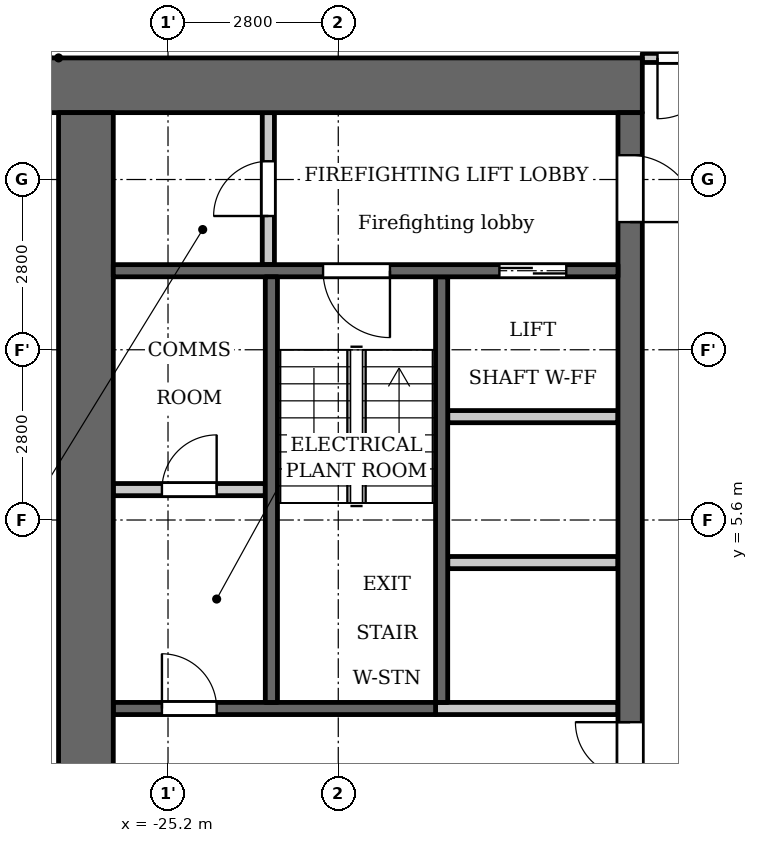
"""IFC4 building model, lengths in metres.
Left out: names, types, materials, properties, quantities, classifications, styles, units other than length and angle.
Written with IfcOpenShell. Run it as: python <this file> out.ifc"""

import sys

from ifc_helpers import new_model, si_unit, direction, frame, frame_2d, origin, place, context, subcontext, project, spatial, rectangle, extrude, element, fill, save


model = new_model("IFC4")
c1 = context("Model", 3, precision=1e-05, world=origin(), true_north=direction((0.0, 1.0)))
c2 = subcontext(c1, "Body", "Model", "MODEL_VIEW")
j1 = project(units=[si_unit("LENGTHUNIT", "METRE"), si_unit("PLANEANGLEUNIT", "RADIAN")], contexts=[c1])
p1 = place(None, origin())
s1 = spatial("IfcSite", under=j1, at=p1, CompositionType="ELEMENT")
p2 = place(p1, origin())
s2 = spatial("IfcBuilding", under=s1, at=p2, CompositionType="ELEMENT")
p3 = place(p2, frame((0.0, 0.0, 121.8)))
s3 = spatial("IfcBuildingStorey", under=s2, at=p3, CompositionType="ELEMENT", Elevation=121.8)
p4 = place(p3, frame((-20.7, 2.6, 0.0), z_axis=(0.0, 0.0, 1.0), x_axis=(0.0, 1.0, 0.0)))
e1 = element("IfcWall", 1, at=p4, inside=s3, PredefinedType="SHEAR", context=c2, shape_type="SweptSolid", body=[
    extrude(rectangle(XDim=7.0, YDim=0.2, at=frame_2d((3.5, 0.0))), origin(), (0.0, 0.0, 1.0), 3.15),
])
p5 = place(p3, frame((-20.8, 2.5, 0.0), z_axis=(0.0, 0.0, 1.0), x_axis=(-1.0, 0.0, 0.0)))
e2 = element("IfcWall", 2, at=p5, inside=s3, PredefinedType="SHEAR", context=c2, shape_type="SweptSolid", body=[
    extrude(rectangle(XDim=5.3, YDim=0.2, at=frame_2d((2.65, 0.0))), origin(), (0.0, 0.0, 1.0), 3.15),
])
p6 = place(p5, frame((3.6, 0.0, 0.0)))
e3 = element("IfcOpeningElement", 3, at=p6, cuts=e2, PredefinedType="OPENING", context=c2, shape_type="SweptSolid", body=[
    extrude(rectangle(XDim=0.9, YDim=2.1, at=frame_2d((0.45, 1.05))), frame((0.0, 0.11, 0.0), z_axis=(0.0, -1.0, 0.0), x_axis=(1.0, 0.0, 0.0)), (0.0, 0.0, 1.0), 0.22),
])
p7 = place(p3, frame((-17.4, 12.75, 0.0), z_axis=(0.0, 0.0, 1.0), x_axis=(-1.0, 0.0, 0.0)))
e4 = element("IfcWall", 4, at=p7, inside=s3, PredefinedType="SHEAR", context=c2, shape_type="SweptSolid", body=[
    extrude(rectangle(XDim=10.4, YDim=0.9, at=frame_2d((5.2, 0.0))), origin(), (0.0, 0.0, 1.0), 3.15),
])
p8 = place(p3, frame((-17.6, -12.3, 0.0), z_axis=(0.0, 0.0, 1.0), x_axis=(0.0, 1.0, 0.0)))
e5 = element("IfcWall", 5, at=p8, inside=s3, PredefinedType="SHEAR", context=c2, shape_type="SweptSolid", body=[
    extrude(rectangle(XDim=24.6, YDim=0.4, at=frame_2d((12.3, 0.0))), origin(), (0.0, 0.0, 1.0), 3.15),
])
p9 = place(p8, frame((6.0, 0.0, 0.0)))
e6 = element("IfcOpeningElement", 6, at=p9, cuts=e5, PredefinedType="OPENING", context=c2, shape_type="SweptSolid", body=[
    extrude(rectangle(XDim=1.1, YDim=2.1, at=frame_2d((0.55, 1.05))), frame((0.0, 0.21, 0.0), z_axis=(0.0, -1.0, 0.0), x_axis=(1.0, 0.0, 0.0)), (0.0, 0.0, 1.0), 0.42),
])
p10 = place(p8, frame((8.4, 0.0, 0.0)))
e7 = element("IfcOpeningElement", 7, at=p10, cuts=e5, PredefinedType="OPENING", context=c2, shape_type="SweptSolid", body=[
    extrude(rectangle(XDim=1.1, YDim=2.1, at=frame_2d((0.55, 1.05))), frame((0.0, 0.21, 0.0), z_axis=(0.0, -1.0, 0.0), x_axis=(1.0, 0.0, 0.0)), (0.0, 0.0, 1.0), 0.42),
])
p11 = place(p8, frame((10.8, 0.0, 0.0)))
e8 = element("IfcOpeningElement", 8, at=p11, cuts=e5, PredefinedType="OPENING", context=c2, shape_type="SweptSolid", body=[
    extrude(rectangle(XDim=1.1, YDim=2.1, at=frame_2d((0.55, 1.05))), frame((0.0, 0.21, 0.0), z_axis=(0.0, -1.0, 0.0), x_axis=(1.0, 0.0, 0.0)), (0.0, 0.0, 1.0), 0.42),
])
p12 = place(p8, frame((22.8, 0.0, 0.0)))
e9 = element("IfcOpeningElement", 9, at=p12, cuts=e5, PredefinedType="OPENING", context=c2, shape_type="SweptSolid", body=[
    extrude(rectangle(XDim=1.1, YDim=2.1, at=frame_2d((0.55, 1.05))), frame((0.0, 0.21, 0.0), z_axis=(0.0, -1.0, 0.0), x_axis=(1.0, 0.0, 0.0)), (0.0, 0.0, 1.0), 0.42),
])
p13 = place(p8, frame((0.7, 0.0, 0.0)))
e10 = element("IfcOpeningElement", 10, at=p13, cuts=e5, PredefinedType="OPENING", context=c2, shape_type="SweptSolid", body=[
    extrude(rectangle(XDim=1.1, YDim=2.1, at=frame_2d((0.55, 1.05))), frame((0.0, 0.21, 0.0), z_axis=(0.0, -1.0, 0.0), x_axis=(1.0, 0.0, 0.0)), (0.0, 0.0, 1.0), 0.42),
])
p14 = place(p8, frame((12.775, 0.0, 0.0)))
e11 = element("IfcOpeningElement", 11, at=p14, cuts=e5, PredefinedType="OPENING", context=c2, shape_type="SweptSolid", body=[
    extrude(rectangle(XDim=1.8, YDim=2.1, at=frame_2d((0.9, 1.05))), frame((0.0, 0.21, 0.0), z_axis=(0.0, -1.0, 0.0), x_axis=(1.0, 0.0, 0.0)), (0.0, 0.0, 1.0), 0.42),
])
p15 = place(p3, frame((-26.55, -12.3, 0.0), z_axis=(0.0, 0.0, 1.0), x_axis=(0.0, 1.0, 0.0)))
e12 = element("IfcWall", 12, at=p15, inside=s3, PredefinedType="SHEAR", context=c2, shape_type="SweptSolid", body=[
    extrude(rectangle(XDim=24.6, YDim=0.9, at=frame_2d((12.3, 0.0))), origin(), (0.0, 0.0, 1.0), 3.15),
])
p16 = place(p3, frame((-23.55, 9.8, 0.0), z_axis=(0.0, 0.0, 1.0), x_axis=(0.0, 1.0, 0.0)))
e13 = element("IfcWall", 13, at=p16, inside=s3, PredefinedType="PARTITIONING", context=c2, shape_type="SweptSolid", body=[
    extrude(rectangle(XDim=2.5, YDim=0.2, at=frame_2d((1.25, 0.0))), origin(), (0.0, 0.0, 1.0), 3.15),
])
p17 = place(p16, frame((0.8, 0.0, 0.0)))
e14 = element("IfcOpeningElement", 14, at=p17, cuts=e13, PredefinedType="OPENING", context=c2, shape_type="SweptSolid", body=[
    extrude(rectangle(XDim=0.9, YDim=2.1, at=frame_2d((0.45, 1.05))), frame((0.0, 0.11, 0.0), z_axis=(0.0, -1.0, 0.0), x_axis=(1.0, 0.0, 0.0)), (0.0, 0.0, 1.0), 0.22),
])
p18 = place(p3, frame((-23.6, 6.1, 0.0), z_axis=(0.0, 0.0, 1.0), x_axis=(-1.0, 0.0, 0.0)))
e15 = element("IfcWall", 15, at=p18, inside=s3, PredefinedType="PARTITIONING", context=c2, shape_type="SweptSolid", body=[
    extrude(rectangle(XDim=2.5, YDim=0.2, at=frame_2d((1.25, 0.0))), origin(), (0.0, 0.0, 1.0), 3.15),
])
p19 = place(p18, frame((0.8, 0.0, 0.0)))
e16 = element("IfcOpeningElement", 16, at=p19, cuts=e15, PredefinedType="OPENING", context=c2, shape_type="SweptSolid", body=[
    extrude(rectangle(XDim=0.9, YDim=2.1, at=frame_2d((0.45, 1.05))), frame((0.0, 0.11, 0.0), z_axis=(0.0, -1.0, 0.0), x_axis=(1.0, 0.0, 0.0)), (0.0, 0.0, 1.0), 0.22),
])
p20 = place(p3, frame((-17.8, 2.5, 0.0), z_axis=(0.0, 0.0, 1.0), x_axis=(-1.0, 0.0, 0.0)))
e17 = element("IfcWall", 17, at=p20, inside=s3, PredefinedType="PARTITIONING", context=c2, shape_type="SweptSolid", body=[
    extrude(rectangle(XDim=3.0, YDim=0.2, at=frame_2d((1.5, 0.0))), origin(), (0.0, 0.0, 1.0), 3.15),
])
for number, where, z_axis, x_axis in (
    (18, (-17.8, 4.9, 0.0), (0.0, 0.0, 1.0), (-1.0, 0.0, 0.0)),
    (19, (-17.8, 7.3, 0.0), (0.0, 0.0, 1.0), (-1.0, 0.0, 0.0)),
):
    element("IfcWall", number, at=place(p3, frame(where, z_axis=z_axis, x_axis=x_axis)), inside=s3, PredefinedType="PARTITIONING", context=c2, shape_type="SweptSolid", body=[
        extrude(rectangle(XDim=2.8, YDim=0.2, at=frame_2d((1.4, 0.0))), origin(), (0.0, 0.0, 1.0), 3.15),
    ])
p21 = place(p3, frame((-17.8, 9.7, 0.0), z_axis=(0.0, 0.0, 1.0), x_axis=(-1.0, 0.0, 0.0)))
e20 = element("IfcWall", 20, at=p21, inside=s3, PredefinedType="SHEAR", context=c2, shape_type="SweptSolid", body=[
    extrude(rectangle(XDim=8.3, YDim=0.2, at=frame_2d((4.15, 0.0))), origin(), (0.0, 0.0, 1.0), 3.15),
])
p22 = place(p21, frame((0.85, 0.0, 0.0)))
e21 = element("IfcOpeningElement", 21, at=p22, cuts=e20, PredefinedType="OPENING", context=c2, shape_type="SweptSolid", body=[
    extrude(rectangle(XDim=1.1, YDim=2.1, at=frame_2d((0.55, 1.05))), frame((0.0, 0.11, 0.0), z_axis=(0.0, -1.0, 0.0), x_axis=(1.0, 0.0, 0.0)), (0.0, 0.0, 1.0), 0.22),
])
p23 = place(p21, frame((3.75, 0.0, 0.0)))
e22 = element("IfcOpeningElement", 22, at=p23, cuts=e20, PredefinedType="OPENING", context=c2, shape_type="SweptSolid", body=[
    extrude(rectangle(XDim=1.1, YDim=2.1, at=frame_2d((0.55, 1.05))), frame((0.0, 0.11, 0.0), z_axis=(0.0, -1.0, 0.0), x_axis=(1.0, 0.0, 0.0)), (0.0, 0.0, 1.0), 0.22),
])
p24 = place(p3, frame((-23.5, 2.6, 0.0), z_axis=(0.0, 0.0, 1.0), x_axis=(0.0, 1.0, 0.0)))
e23 = element("IfcWall", 23, at=p24, inside=s3, PredefinedType="SHEAR", context=c2, shape_type="SweptSolid", body=[
    extrude(rectangle(XDim=7.0, YDim=0.2, at=frame_2d((3.5, 0.0))), origin(), (0.0, 0.0, 1.0), 3.15),
])
p25 = place(p3, frame((-17.4, 13.2, 0.0), z_axis=(0.0, 0.0, 1.0), x_axis=(1.0, 0.0, 0.0)))
e24 = element("IfcWall", 24, at=p25, inside=s3, PredefinedType="PARTITIONING", context=c2, shape_type="SweptSolid", body=[
    extrude(rectangle(XDim=34.8, YDim=0.15, at=frame_2d((17.4, 0.0))), origin(), (0.0, 0.0, 1.0), 3.15),
])
p26 = place(p25, frame((0.25, 0.0, 0.0)))
e25 = element("IfcOpeningElement", 25, at=p26, cuts=e24, PredefinedType="OPENING", context=c2, shape_type="SweptSolid", body=[
    extrude(rectangle(XDim=1.0, YDim=2.1, at=frame_2d((0.5, 1.05))), frame((0.0, 0.085, 0.0), z_axis=(0.0, -1.0, 0.0), x_axis=(1.0, 0.0, 0.0)), (0.0, 0.0, 1.0), 0.17),
])
p27 = place(p25, frame((33.65, 0.0, 0.0)))
e26 = element("IfcOpeningElement", 26, at=p27, cuts=e24, PredefinedType="OPENING", context=c2, shape_type="SweptSolid", body=[
    extrude(rectangle(XDim=1.0, YDim=2.1, at=frame_2d((0.5, 1.05))), frame((0.0, 0.085, 0.0), z_axis=(0.0, -1.0, 0.0), x_axis=(1.0, 0.0, 0.0)), (0.0, 0.0, 1.0), 0.17),
])
p28 = place(p25, frame((15.75, 0.0, 0.0)))
e27 = element("IfcOpeningElement", 27, at=p28, cuts=e24, PredefinedType="OPENING", context=c2, shape_type="SweptSolid", body=[
    extrude(rectangle(XDim=1.0, YDim=2.1, at=frame_2d((0.5, 1.05))), frame((0.0, 0.085, 0.0), z_axis=(0.0, -1.0, 0.0), x_axis=(1.0, 0.0, 0.0)), (0.0, 0.0, 1.0), 0.17),
])
p29 = place(p25, frame((18.1, 0.0, 0.0)))
e28 = element("IfcOpeningElement", 28, at=p29, cuts=e24, PredefinedType="OPENING", context=c2, shape_type="SweptSolid", body=[
    extrude(rectangle(XDim=1.0, YDim=2.1, at=frame_2d((0.5, 1.05))), frame((0.0, 0.085, 0.0), z_axis=(0.0, -1.0, 0.0), x_axis=(1.0, 0.0, 0.0)), (0.0, 0.0, 1.0), 0.17),
])
p30 = place(p25, frame((23.55, 0.0, 0.0)))
e29 = element("IfcOpeningElement", 29, at=p30, cuts=e24, PredefinedType="OPENING", context=c2, shape_type="SweptSolid", body=[
    extrude(rectangle(XDim=1.0, YDim=2.1, at=frame_2d((0.5, 1.05))), frame((0.0, 0.085, 0.0), z_axis=(0.0, -1.0, 0.0), x_axis=(1.0, 0.0, 0.0)), (0.0, 0.0, 1.0), 0.17),
])
p31 = place(p22, origin())
e30 = element("IfcDoor", 30, at=p31, inside=s3, OperationType="DOUBLE_DOOR_SLIDING", PredefinedType="DOOR", context=c2, shape_type="SweptSolid", body=[
    extrude(rectangle(XDim=1.1, YDim=2.1, at=frame_2d((0.55, 1.05))), frame((0.0, 0.025, 0.0), z_axis=(0.0, -1.0, 0.0), x_axis=(1.0, 0.0, 0.0)), (0.0, 0.0, 1.0), 0.05),
])
fill(e21, e30)
p32 = place(p12, origin())
e31 = element("IfcDoor", 31, at=p32, inside=s3, OperationType="SINGLE_SWING_LEFT", PredefinedType="DOOR", context=c2, shape_type="SweptSolid", body=[
    extrude(rectangle(XDim=1.1, YDim=2.1, at=frame_2d((0.55, 1.05))), frame((0.0, 0.025, 0.0), z_axis=(0.0, -1.0, 0.0), x_axis=(1.0, 0.0, 0.0)), (0.0, 0.0, 1.0), 0.05),
])
fill(e9, e31)
p33 = place(p17, origin())
e32 = element("IfcDoor", 32, at=p33, inside=s3, OperationType="SINGLE_SWING_RIGHT", PredefinedType="DOOR", context=c2, shape_type="SweptSolid", body=[
    extrude(rectangle(XDim=0.9, YDim=2.1, at=frame_2d((0.45, 1.05))), frame((0.0, 0.025, 0.0), z_axis=(0.0, -1.0, 0.0), x_axis=(1.0, 0.0, 0.0)), (0.0, 0.0, 1.0), 0.05),
])
fill(e14, e32)
p34 = place(p23, origin())
e33 = element("IfcDoor", 33, at=p34, inside=s3, OperationType="SINGLE_SWING_RIGHT", PredefinedType="DOOR", context=c2, shape_type="SweptSolid", body=[
    extrude(rectangle(XDim=1.1, YDim=2.1, at=frame_2d((0.55, 1.05))), frame((0.0, 0.025, 0.0), z_axis=(0.0, -1.0, 0.0), x_axis=(1.0, 0.0, 0.0)), (0.0, 0.0, 1.0), 0.05),
])
fill(e22, e33)
p35 = place(p14, origin())
e34 = element("IfcDoor", 34, at=p35, inside=s3, OperationType="DOUBLE_DOOR_SINGLE_SWING", PredefinedType="DOOR", context=c2, shape_type="SweptSolid", body=[
    extrude(rectangle(XDim=1.8, YDim=2.1, at=frame_2d((0.9, 1.05))), frame((0.0, 0.025, 0.0), z_axis=(0.0, -1.0, 0.0), x_axis=(1.0, 0.0, 0.0)), (0.0, 0.0, 1.0), 0.05),
])
fill(e11, e34)
p36 = place(p19, origin())
e35 = element("IfcDoor", 35, at=p36, inside=s3, OperationType="SINGLE_SWING_LEFT", PredefinedType="DOOR", context=c2, shape_type="SweptSolid", body=[
    extrude(rectangle(XDim=0.9, YDim=2.1, at=frame_2d((0.45, 1.05))), frame((0.0, 0.025, 0.0), z_axis=(0.0, -1.0, 0.0), x_axis=(1.0, 0.0, 0.0)), (0.0, 0.0, 1.0), 0.05),
])
fill(e16, e35)
p37 = place(p6, origin())
e36 = element("IfcDoor", 36, at=p37, inside=s3, OperationType="SINGLE_SWING_RIGHT", PredefinedType="DOOR", context=c2, shape_type="SweptSolid", body=[
    extrude(rectangle(XDim=0.9, YDim=2.1, at=frame_2d((0.45, 1.05))), frame((0.0, 0.025, 0.0), z_axis=(0.0, -1.0, 0.0), x_axis=(1.0, 0.0, 0.0)), (0.0, 0.0, 1.0), 0.05),
])
fill(e3, e36)
p38 = place(p26, origin())
e37 = element("IfcDoor", 37, at=p38, inside=s3, OperationType="SINGLE_SWING_LEFT", PredefinedType="DOOR", context=c2, shape_type="SweptSolid", body=[
    extrude(rectangle(XDim=1.0, YDim=2.1, at=frame_2d((0.5, 1.05))), frame((0.0, 0.025, 0.0), z_axis=(0.0, -1.0, 0.0), x_axis=(1.0, 0.0, 0.0)), (0.0, 0.0, 1.0), 0.05),
])
fill(e25, e37)
save(model, sys.argv[1])
